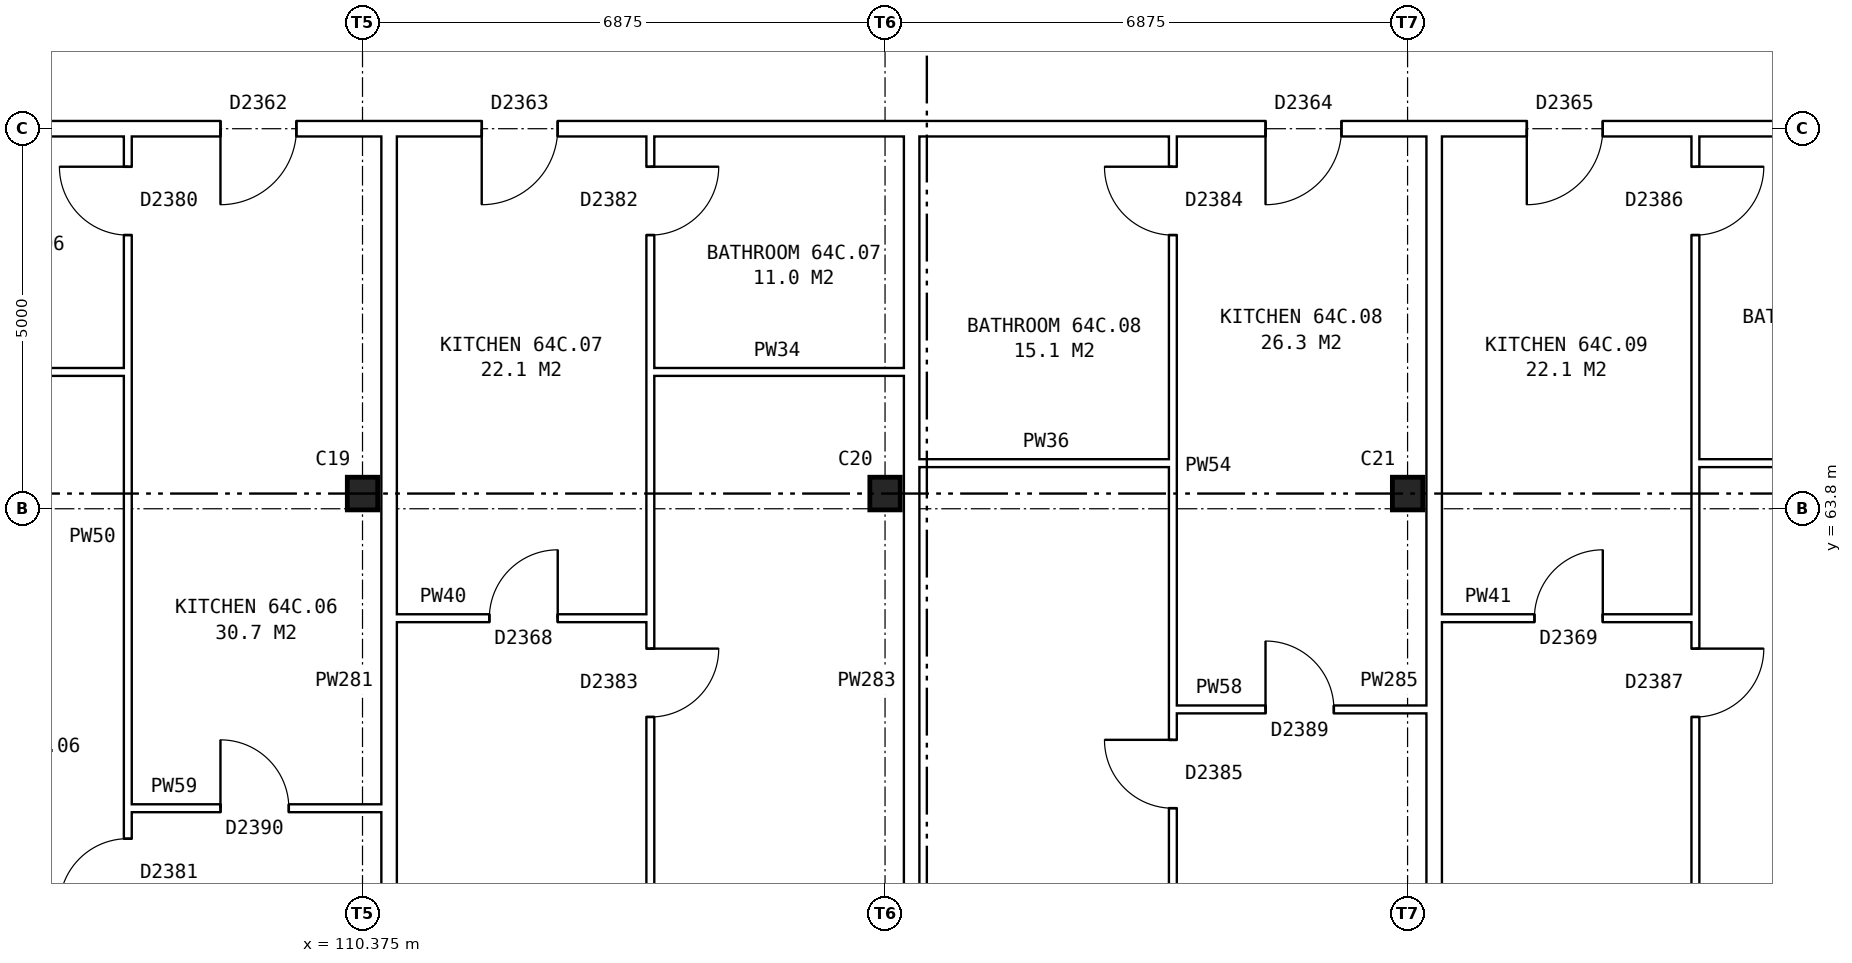
"""IFC4 building model, lengths in metres.
Left out: names, types, materials, properties, quantities, classifications, styles, units other than length and angle.
Written with IfcOpenShell. Run it as: python <this file> out.ifc"""

import sys

from ifc_helpers import new_model, si_unit, direction, frame, frame_2d, origin, origin_2d, place, context, subcontext, project, spatial, rectangle, i_section, extrude, element, fill, save


model = new_model("IFC4")
c1 = context("Model", 3, precision=1e-05, world=origin(), true_north=direction((0.0, 1.0)))
c2 = subcontext(c1, "Body", "Model", "MODEL_VIEW")
j1 = project(units=[si_unit("LENGTHUNIT", "METRE"), si_unit("PLANEANGLEUNIT", "RADIAN")], contexts=[c1])
p1 = place(None, origin())
s1 = spatial("IfcSite", under=j1, at=p1, CompositionType="ELEMENT")
p2 = place(p1, origin())
s2 = spatial("IfcBuilding", under=s1, at=p2, CompositionType="ELEMENT")
p3 = place(p2, frame((0.0, 0.0, 227.6)))
s3 = spatial("IfcBuildingStorey", under=s2, at=p3, CompositionType="ELEMENT", Elevation=227.6)
for number, where, z_axis, x_axis in (
    (1, (110.375, 64.0, 0.0), (0.0, 0.0, 1.0), (1.0, 0.0, 0.0)),
    (2, (117.25, 64.0, 0.0), (0.0, 0.0, 1.0), (1.0, 0.0, 0.0)),
    (3, (124.125, 64.0, 0.0), (0.0, 0.0, 1.0), (1.0, 0.0, 0.0)),
):
    element("IfcColumn", number, at=place(p3, frame(where, z_axis=z_axis, x_axis=x_axis)), inside=s3, PredefinedType="COLUMN", context=c2, shape_type="SweptSolid", body=[
        extrude(i_section(OverallWidth=0.4, OverallDepth=0.43, WebThickness=0.04, FlangeThickness=0.04, at=origin_2d()), origin(), (0.0, 0.0, 1.0), 2.85),
    ])
p4 = place(p3, frame((107.287, 59.86, 0.0), z_axis=(0.0, 0.0, 1.0), x_axis=(1.0, 0.0, 0.0)))
e4 = element("IfcWall", 4, at=p4, inside=s3, PredefinedType="PARTITIONING", context=c2, shape_type="SweptSolid", body=[
    extrude(rectangle(XDim=3.338, YDim=0.1, at=frame_2d((1.669, 0.0))), origin(), (0.0, 0.0, 1.0), 2.85),
])
p5 = place(p4, frame((1.219, 0.0, 0.0)))
e5 = element("IfcOpeningElement", 5, at=p5, cuts=e4, PredefinedType="OPENING", context=c2, shape_type="SweptSolid", body=[
    extrude(rectangle(XDim=0.9, YDim=2.1, at=frame_2d((0.45, 1.05))), frame((0.0, 0.06, 0.0), z_axis=(0.0, -1.0, 0.0), x_axis=(1.0, 0.0, 0.0)), (0.0, 0.0, 1.0), 0.12),
])
p6 = place(p3, frame((121.037, 61.16, 0.0), z_axis=(0.0, 0.0, 1.0), x_axis=(1.0, 0.0, 0.0)))
e6 = element("IfcWall", 6, at=p6, inside=s3, PredefinedType="PARTITIONING", context=c2, shape_type="SweptSolid", body=[
    extrude(rectangle(XDim=3.338, YDim=0.1, at=frame_2d((1.669, 0.0))), origin(), (0.0, 0.0, 1.0), 2.85),
])
p7 = place(p6, frame((1.219, 0.0, 0.0)))
e7 = element("IfcOpeningElement", 7, at=p7, cuts=e6, PredefinedType="OPENING", context=c2, shape_type="SweptSolid", body=[
    extrude(rectangle(XDim=0.9, YDim=2.1, at=frame_2d((0.45, 1.05))), frame((0.0, 0.06, 0.0), z_axis=(0.0, -1.0, 0.0), x_axis=(1.0, 0.0, 0.0)), (0.0, 0.0, 1.0), 0.12),
])
p8 = place(p3, frame((110.825, 62.36, 0.0), z_axis=(0.0, 0.0, 1.0), x_axis=(1.0, 0.0, 0.0)))
e8 = element("IfcWall", 8, at=p8, inside=s3, PredefinedType="PARTITIONING", context=c2, shape_type="SweptSolid", body=[
    extrude(rectangle(XDim=3.337, YDim=0.1, at=frame_2d((1.668, 0.0))), origin(), (0.0, 0.0, 1.0), 2.85),
])
p9 = place(p8, frame((1.219, 0.0, 0.0)))
e9 = element("IfcOpeningElement", 9, at=p9, cuts=e8, PredefinedType="OPENING", context=c2, shape_type="SweptSolid", body=[
    extrude(rectangle(XDim=0.9, YDim=2.1, at=frame_2d((0.45, 1.05))), frame((0.0, 0.06, 0.0), z_axis=(0.0, -1.0, 0.0), x_axis=(1.0, 0.0, 0.0)), (0.0, 0.0, 1.0), 0.12),
])
p10 = place(p3, frame((124.575, 62.36, 0.0), z_axis=(0.0, 0.0, 1.0), x_axis=(1.0, 0.0, 0.0)))
e10 = element("IfcWall", 10, at=p10, inside=s3, PredefinedType="PARTITIONING", context=c2, shape_type="SweptSolid", body=[
    extrude(rectangle(XDim=3.337, YDim=0.1, at=frame_2d((1.668, 0.0))), origin(), (0.0, 0.0, 1.0), 2.85),
])
p11 = place(p10, frame((1.219, 0.0, 0.0)))
e11 = element("IfcOpeningElement", 11, at=p11, cuts=e10, PredefinedType="OPENING", context=c2, shape_type="SweptSolid", body=[
    extrude(rectangle(XDim=0.9, YDim=2.1, at=frame_2d((0.45, 1.05))), frame((0.0, 0.06, 0.0), z_axis=(0.0, -1.0, 0.0), x_axis=(1.0, 0.0, 0.0)), (0.0, 0.0, 1.0), 0.12),
])
p12 = place(p3, frame((117.7, 64.4, 0.0), z_axis=(0.0, 0.0, 1.0), x_axis=(1.0, 0.0, 0.0)))
e12 = element("IfcWall", 12, at=p12, inside=s3, PredefinedType="PARTITIONING", context=c2, shape_type="SweptSolid", body=[
    extrude(rectangle(XDim=3.337, YDim=0.1, at=frame_2d((1.668, 0.0))), origin(), (0.0, 0.0, 1.0), 2.85),
])
p13 = place(p3, frame((127.912, 64.4, 0.0), z_axis=(0.0, 0.0, 1.0), x_axis=(1.0, 0.0, 0.0)))
e13 = element("IfcWall", 13, at=p13, inside=s3, PredefinedType="PARTITIONING", context=c2, shape_type="SweptSolid", body=[
    extrude(rectangle(XDim=3.448, YDim=0.1, at=frame_2d((1.724, 0.0))), origin(), (0.0, 0.0, 1.0), 2.85),
])
p14 = place(p3, frame((100.412, 65.6, 0.0), z_axis=(0.0, 0.0, 1.0), x_axis=(1.0, 0.0, 0.0)))
e14 = element("IfcWall", 14, at=p14, inside=s3, PredefinedType="PARTITIONING", context=c2, shape_type="SweptSolid", body=[
    extrude(rectangle(XDim=6.875, YDim=0.1, at=frame_2d((3.438, 0.0))), origin(), (0.0, 0.0, 1.0), 2.85),
])
p15 = place(p3, frame((114.162, 65.6, 0.0), z_axis=(0.0, 0.0, 1.0), x_axis=(1.0, 0.0, 0.0)))
e15 = element("IfcWall", 15, at=p15, inside=s3, PredefinedType="PARTITIONING", context=c2, shape_type="SweptSolid", body=[
    extrude(rectangle(XDim=3.338, YDim=0.1, at=frame_2d((1.669, 0.0))), origin(), (0.0, 0.0, 1.0), 2.85),
])
p16 = place(p3, frame((75.64, 68.8, 0.0), z_axis=(0.0, 0.0, 1.0), x_axis=(1.0, 0.0, 0.0)))
e16 = element("IfcWall", 16, at=p16, inside=s3, PredefinedType="PARTITIONING", context=c2, shape_type="SweptSolid", body=[
    extrude(rectangle(XDim=55.72, YDim=0.2, at=frame_2d((27.86, 0.0))), origin(), (0.0, 0.0, 1.0), 2.85),
])
p17 = place(p16, frame((1.399, 0.0, 0.0)))
e17 = element("IfcOpeningElement", 17, at=p17, cuts=e16, PredefinedType="OPENING", context=c2, shape_type="SweptSolid", body=[
    extrude(rectangle(XDim=1.0, YDim=2.1, at=frame_2d((0.5, 1.05))), frame((0.0, 0.11, 0.0), z_axis=(0.0, -1.0, 0.0), x_axis=(1.0, 0.0, 0.0)), (0.0, 0.0, 1.0), 0.22),
])
p18 = place(p16, frame((12.241, 0.0, 0.0)))
e18 = element("IfcOpeningElement", 18, at=p18, cuts=e16, PredefinedType="OPENING", context=c2, shape_type="SweptSolid", body=[
    extrude(rectangle(XDim=1.0, YDim=2.1, at=frame_2d((0.5, 1.05))), frame((0.0, 0.11, 0.0), z_axis=(0.0, -1.0, 0.0), x_axis=(1.0, 0.0, 0.0)), (0.0, 0.0, 1.0), 0.22),
])
p19 = place(p16, frame((22.553, 0.0, 0.0)))
e19 = element("IfcOpeningElement", 19, at=p19, cuts=e16, PredefinedType="OPENING", context=c2, shape_type="SweptSolid", body=[
    extrude(rectangle(XDim=1.0, YDim=2.1, at=frame_2d((0.5, 1.05))), frame((0.0, 0.11, 0.0), z_axis=(0.0, -1.0, 0.0), x_axis=(1.0, 0.0, 0.0)), (0.0, 0.0, 1.0), 0.22),
])
p20 = place(p16, frame((32.866, 0.0, 0.0)))
e20 = element("IfcOpeningElement", 20, at=p20, cuts=e16, PredefinedType="OPENING", context=c2, shape_type="SweptSolid", body=[
    extrude(rectangle(XDim=1.0, YDim=2.1, at=frame_2d((0.5, 1.05))), frame((0.0, 0.11, 0.0), z_axis=(0.0, -1.0, 0.0), x_axis=(1.0, 0.0, 0.0)), (0.0, 0.0, 1.0), 0.22),
])
p21 = place(p16, frame((36.303, 0.0, 0.0)))
e21 = element("IfcOpeningElement", 21, at=p21, cuts=e16, PredefinedType="OPENING", context=c2, shape_type="SweptSolid", body=[
    extrude(rectangle(XDim=1.0, YDim=2.1, at=frame_2d((0.5, 1.05))), frame((0.0, 0.11, 0.0), z_axis=(0.0, -1.0, 0.0), x_axis=(1.0, 0.0, 0.0)), (0.0, 0.0, 1.0), 0.22),
])
p22 = place(p16, frame((46.616, 0.0, 0.0)))
e22 = element("IfcOpeningElement", 22, at=p22, cuts=e16, PredefinedType="OPENING", context=c2, shape_type="SweptSolid", body=[
    extrude(rectangle(XDim=1.0, YDim=2.1, at=frame_2d((0.5, 1.05))), frame((0.0, 0.11, 0.0), z_axis=(0.0, -1.0, 0.0), x_axis=(1.0, 0.0, 0.0)), (0.0, 0.0, 1.0), 0.22),
])
p23 = place(p16, frame((50.053, 0.0, 0.0)))
e23 = element("IfcOpeningElement", 23, at=p23, cuts=e16, PredefinedType="OPENING", context=c2, shape_type="SweptSolid", body=[
    extrude(rectangle(XDim=1.0, YDim=2.1, at=frame_2d((0.5, 1.05))), frame((0.0, 0.11, 0.0), z_axis=(0.0, -1.0, 0.0), x_axis=(1.0, 0.0, 0.0)), (0.0, 0.0, 1.0), 0.22),
])
p24 = place(p3, frame((107.287, 54.36, 0.0), z_axis=(0.0, 0.0, 1.0), x_axis=(0.0, 1.0, 0.0)))
e24 = element("IfcWall", 24, at=p24, inside=s3, PredefinedType="PARTITIONING", context=c2, shape_type="SweptSolid", body=[
    extrude(rectangle(XDim=14.34, YDim=0.1, at=frame_2d((7.17, 0.0))), origin(), (0.0, 0.0, 1.0), 2.85),
])
p25 = place(p24, frame((4.2, 0.0, 0.0)))
e25 = element("IfcOpeningElement", 25, at=p25, cuts=e24, PredefinedType="OPENING", context=c2, shape_type="SweptSolid", body=[
    extrude(rectangle(XDim=0.9, YDim=2.1, at=frame_2d((0.45, 1.05))), frame((0.0, 0.06, 0.0), z_axis=(0.0, -1.0, 0.0), x_axis=(1.0, 0.0, 0.0)), (0.0, 0.0, 1.0), 0.12),
])
p26 = place(p24, frame((13.04, 0.0, 0.0)))
e26 = element("IfcOpeningElement", 26, at=p26, cuts=e24, PredefinedType="OPENING", context=c2, shape_type="SweptSolid", body=[
    extrude(rectangle(XDim=0.9, YDim=2.1, at=frame_2d((0.45, 1.05))), frame((0.0, 0.06, 0.0), z_axis=(0.0, -1.0, 0.0), x_axis=(1.0, 0.0, 0.0)), (0.0, 0.0, 1.0), 0.12),
])
p27 = place(p3, frame((110.725, 54.36, 0.0), z_axis=(0.0, 0.0, 1.0), x_axis=(0.0, 1.0, 0.0)))
e27 = element("IfcWall", 27, at=p27, inside=s3, PredefinedType="PARTITIONING", context=c2, shape_type="SweptSolid", body=[
    extrude(rectangle(XDim=14.34, YDim=0.2, at=frame_2d((7.17, 0.0))), origin(), (0.0, 0.0, 1.0), 2.85),
])
p28 = place(p3, frame((114.162, 54.36, 0.0), z_axis=(0.0, 0.0, 1.0), x_axis=(0.0, 1.0, 0.0)))
e28 = element("IfcWall", 28, at=p28, inside=s3, PredefinedType="PARTITIONING", context=c2, shape_type="SweptSolid", body=[
    extrude(rectangle(XDim=14.34, YDim=0.1, at=frame_2d((7.17, 0.0))), origin(), (0.0, 0.0, 1.0), 2.85),
])
p29 = place(p28, frame((6.7, 0.0, 0.0)))
e29 = element("IfcOpeningElement", 29, at=p29, cuts=e28, PredefinedType="OPENING", context=c2, shape_type="SweptSolid", body=[
    extrude(rectangle(XDim=0.9, YDim=2.1, at=frame_2d((0.45, 1.05))), frame((0.0, 0.06, 0.0), z_axis=(0.0, -1.0, 0.0), x_axis=(1.0, 0.0, 0.0)), (0.0, 0.0, 1.0), 0.12),
])
p30 = place(p28, frame((13.04, 0.0, 0.0)))
e30 = element("IfcOpeningElement", 30, at=p30, cuts=e28, PredefinedType="OPENING", context=c2, shape_type="SweptSolid", body=[
    extrude(rectangle(XDim=0.9, YDim=2.1, at=frame_2d((0.45, 1.05))), frame((0.0, 0.06, 0.0), z_axis=(0.0, -1.0, 0.0), x_axis=(1.0, 0.0, 0.0)), (0.0, 0.0, 1.0), 0.12),
])
p31 = place(p3, frame((117.6, 54.36, 0.0), z_axis=(0.0, 0.0, 1.0), x_axis=(0.0, 1.0, 0.0)))
e31 = element("IfcWall", 31, at=p31, inside=s3, PredefinedType="PARTITIONING", context=c2, shape_type="SweptSolid", body=[
    extrude(rectangle(XDim=14.34, YDim=0.2, at=frame_2d((7.17, 0.0))), origin(), (0.0, 0.0, 1.0), 2.85),
])
p32 = place(p3, frame((121.037, 54.36, 0.0), z_axis=(0.0, 0.0, 1.0), x_axis=(0.0, 1.0, 0.0)))
e32 = element("IfcWall", 32, at=p32, inside=s3, PredefinedType="PARTITIONING", context=c2, shape_type="SweptSolid", body=[
    extrude(rectangle(XDim=14.34, YDim=0.1, at=frame_2d((7.17, 0.0))), origin(), (0.0, 0.0, 1.0), 2.85),
])
p33 = place(p32, frame((5.5, 0.0, 0.0)))
e33 = element("IfcOpeningElement", 33, at=p33, cuts=e32, PredefinedType="OPENING", context=c2, shape_type="SweptSolid", body=[
    extrude(rectangle(XDim=0.9, YDim=2.1, at=frame_2d((0.45, 1.05))), frame((0.0, 0.06, 0.0), z_axis=(0.0, -1.0, 0.0), x_axis=(1.0, 0.0, 0.0)), (0.0, 0.0, 1.0), 0.12),
])
p34 = place(p32, frame((13.04, 0.0, 0.0)))
e34 = element("IfcOpeningElement", 34, at=p34, cuts=e32, PredefinedType="OPENING", context=c2, shape_type="SweptSolid", body=[
    extrude(rectangle(XDim=0.9, YDim=2.1, at=frame_2d((0.45, 1.05))), frame((0.0, 0.06, 0.0), z_axis=(0.0, -1.0, 0.0), x_axis=(1.0, 0.0, 0.0)), (0.0, 0.0, 1.0), 0.12),
])
p35 = place(p3, frame((124.475, 54.36, 0.0), z_axis=(0.0, 0.0, 1.0), x_axis=(0.0, 1.0, 0.0)))
e35 = element("IfcWall", 35, at=p35, inside=s3, PredefinedType="PARTITIONING", context=c2, shape_type="SweptSolid", body=[
    extrude(rectangle(XDim=14.34, YDim=0.2, at=frame_2d((7.17, 0.0))), origin(), (0.0, 0.0, 1.0), 2.85),
])
p36 = place(p3, frame((127.912, 54.36, 0.0), z_axis=(0.0, 0.0, 1.0), x_axis=(0.0, 1.0, 0.0)))
e36 = element("IfcWall", 36, at=p36, inside=s3, PredefinedType="PARTITIONING", context=c2, shape_type="SweptSolid", body=[
    extrude(rectangle(XDim=14.34, YDim=0.1, at=frame_2d((7.17, 0.0))), origin(), (0.0, 0.0, 1.0), 2.85),
])
p37 = place(p36, frame((6.7, 0.0, 0.0)))
e37 = element("IfcOpeningElement", 37, at=p37, cuts=e36, PredefinedType="OPENING", context=c2, shape_type="SweptSolid", body=[
    extrude(rectangle(XDim=0.9, YDim=2.1, at=frame_2d((0.45, 1.05))), frame((0.0, 0.06, 0.0), z_axis=(0.0, -1.0, 0.0), x_axis=(1.0, 0.0, 0.0)), (0.0, 0.0, 1.0), 0.12),
])
p38 = place(p36, frame((13.04, 0.0, 0.0)))
e38 = element("IfcOpeningElement", 38, at=p38, cuts=e36, PredefinedType="OPENING", context=c2, shape_type="SweptSolid", body=[
    extrude(rectangle(XDim=0.9, YDim=2.1, at=frame_2d((0.45, 1.05))), frame((0.0, 0.06, 0.0), z_axis=(0.0, -1.0, 0.0), x_axis=(1.0, 0.0, 0.0)), (0.0, 0.0, 1.0), 0.12),
])
p39 = place(p25, origin())
e39 = element("IfcDoor", 39, at=p39, inside=s3, OperationType="SINGLE_SWING_LEFT", PredefinedType="DOOR", context=c2, shape_type="SweptSolid", body=[
    extrude(rectangle(XDim=0.9, YDim=2.1, at=frame_2d((0.45, 1.05))), frame((0.0, 0.025, 0.0), z_axis=(0.0, -1.0, 0.0), x_axis=(1.0, 0.0, 0.0)), (0.0, 0.0, 1.0), 0.05),
])
fill(e25, e39)
p40 = place(p20, frame((1.0, 0.0, 0.0), z_axis=(0.0, 0.0, 1.0), x_axis=(-1.0, 0.0, 0.0)))
e40 = element("IfcDoor", 40, at=p40, inside=s3, OperationType="SINGLE_SWING_RIGHT", PredefinedType="DOOR", context=c2, shape_type="SweptSolid", body=[
    extrude(rectangle(XDim=1.0, YDim=2.1, at=frame_2d((0.5, 1.05))), frame((0.0, 0.025, 0.0), z_axis=(0.0, -1.0, 0.0), x_axis=(1.0, 0.0, 0.0)), (0.0, 0.0, 1.0), 0.05),
])
fill(e20, e40)
p41 = place(p5, origin())
e41 = element("IfcDoor", 41, at=p41, inside=s3, OperationType="SINGLE_SWING_LEFT", PredefinedType="DOOR", context=c2, shape_type="SweptSolid", body=[
    extrude(rectangle(XDim=0.9, YDim=2.1, at=frame_2d((0.45, 1.05))), frame((0.0, 0.025, 0.0), z_axis=(0.0, -1.0, 0.0), x_axis=(1.0, 0.0, 0.0)), (0.0, 0.0, 1.0), 0.05),
])
fill(e5, e41)
p42 = place(p26, origin())
e42 = element("IfcDoor", 42, at=p42, inside=s3, OperationType="SINGLE_SWING_RIGHT", PredefinedType="DOOR", context=c2, shape_type="SweptSolid", body=[
    extrude(rectangle(XDim=0.9, YDim=2.1, at=frame_2d((0.45, 1.05))), frame((0.0, 0.025, 0.0), z_axis=(0.0, -1.0, 0.0), x_axis=(1.0, 0.0, 0.0)), (0.0, 0.0, 1.0), 0.05),
])
fill(e26, e42)
p43 = place(p29, frame((0.9, 0.0, 0.0), z_axis=(0.0, 0.0, 1.0), x_axis=(-1.0, 0.0, 0.0)))
e43 = element("IfcDoor", 43, at=p43, inside=s3, OperationType="SINGLE_SWING_LEFT", PredefinedType="DOOR", context=c2, shape_type="SweptSolid", body=[
    extrude(rectangle(XDim=0.9, YDim=2.1, at=frame_2d((0.45, 1.05))), frame((0.0, 0.025, 0.0), z_axis=(0.0, -1.0, 0.0), x_axis=(1.0, 0.0, 0.0)), (0.0, 0.0, 1.0), 0.05),
])
fill(e29, e43)
p44 = place(p21, frame((1.0, 0.0, 0.0), z_axis=(0.0, 0.0, 1.0), x_axis=(-1.0, 0.0, 0.0)))
e44 = element("IfcDoor", 44, at=p44, inside=s3, OperationType="SINGLE_SWING_RIGHT", PredefinedType="DOOR", context=c2, shape_type="SweptSolid", body=[
    extrude(rectangle(XDim=1.0, YDim=2.1, at=frame_2d((0.5, 1.05))), frame((0.0, 0.025, 0.0), z_axis=(0.0, -1.0, 0.0), x_axis=(1.0, 0.0, 0.0)), (0.0, 0.0, 1.0), 0.05),
])
fill(e21, e44)
p45 = place(p9, origin())
e45 = element("IfcDoor", 45, at=p45, inside=s3, OperationType="SINGLE_SWING_RIGHT", PredefinedType="DOOR", context=c2, shape_type="SweptSolid", body=[
    extrude(rectangle(XDim=0.9, YDim=2.1, at=frame_2d((0.45, 1.05))), frame((0.0, 0.025, 0.0), z_axis=(0.0, -1.0, 0.0), x_axis=(1.0, 0.0, 0.0)), (0.0, 0.0, 1.0), 0.05),
])
fill(e9, e45)
p46 = place(p30, frame((0.9, 0.0, 0.0), z_axis=(0.0, 0.0, 1.0), x_axis=(-1.0, 0.0, 0.0)))
e46 = element("IfcDoor", 46, at=p46, inside=s3, OperationType="SINGLE_SWING_LEFT", PredefinedType="DOOR", context=c2, shape_type="SweptSolid", body=[
    extrude(rectangle(XDim=0.9, YDim=2.1, at=frame_2d((0.45, 1.05))), frame((0.0, 0.025, 0.0), z_axis=(0.0, -1.0, 0.0), x_axis=(1.0, 0.0, 0.0)), (0.0, 0.0, 1.0), 0.05),
])
fill(e30, e46)
p47 = place(p33, origin())
e47 = element("IfcDoor", 47, at=p47, inside=s3, OperationType="SINGLE_SWING_RIGHT", PredefinedType="DOOR", context=c2, shape_type="SweptSolid", body=[
    extrude(rectangle(XDim=0.9, YDim=2.1, at=frame_2d((0.45, 1.05))), frame((0.0, 0.025, 0.0), z_axis=(0.0, -1.0, 0.0), x_axis=(1.0, 0.0, 0.0)), (0.0, 0.0, 1.0), 0.05),
])
fill(e33, e47)
p48 = place(p22, frame((1.0, 0.0, 0.0), z_axis=(0.0, 0.0, 1.0), x_axis=(-1.0, 0.0, 0.0)))
e48 = element("IfcDoor", 48, at=p48, inside=s3, OperationType="SINGLE_SWING_RIGHT", PredefinedType="DOOR", context=c2, shape_type="SweptSolid", body=[
    extrude(rectangle(XDim=1.0, YDim=2.1, at=frame_2d((0.5, 1.05))), frame((0.0, 0.025, 0.0), z_axis=(0.0, -1.0, 0.0), x_axis=(1.0, 0.0, 0.0)), (0.0, 0.0, 1.0), 0.05),
])
fill(e22, e48)
p49 = place(p7, origin())
e49 = element("IfcDoor", 49, at=p49, inside=s3, OperationType="SINGLE_SWING_LEFT", PredefinedType="DOOR", context=c2, shape_type="SweptSolid", body=[
    extrude(rectangle(XDim=0.9, YDim=2.1, at=frame_2d((0.45, 1.05))), frame((0.0, 0.025, 0.0), z_axis=(0.0, -1.0, 0.0), x_axis=(1.0, 0.0, 0.0)), (0.0, 0.0, 1.0), 0.05),
])
fill(e7, e49)
p50 = place(p34, origin())
e50 = element("IfcDoor", 50, at=p50, inside=s3, OperationType="SINGLE_SWING_RIGHT", PredefinedType="DOOR", context=c2, shape_type="SweptSolid", body=[
    extrude(rectangle(XDim=0.9, YDim=2.1, at=frame_2d((0.45, 1.05))), frame((0.0, 0.025, 0.0), z_axis=(0.0, -1.0, 0.0), x_axis=(1.0, 0.0, 0.0)), (0.0, 0.0, 1.0), 0.05),
])
fill(e34, e50)
p51 = place(p37, frame((0.9, 0.0, 0.0), z_axis=(0.0, 0.0, 1.0), x_axis=(-1.0, 0.0, 0.0)))
e51 = element("IfcDoor", 51, at=p51, inside=s3, OperationType="SINGLE_SWING_LEFT", PredefinedType="DOOR", context=c2, shape_type="SweptSolid", body=[
    extrude(rectangle(XDim=0.9, YDim=2.1, at=frame_2d((0.45, 1.05))), frame((0.0, 0.025, 0.0), z_axis=(0.0, -1.0, 0.0), x_axis=(1.0, 0.0, 0.0)), (0.0, 0.0, 1.0), 0.05),
])
fill(e37, e51)
p52 = place(p23, frame((1.0, 0.0, 0.0), z_axis=(0.0, 0.0, 1.0), x_axis=(-1.0, 0.0, 0.0)))
e52 = element("IfcDoor", 52, at=p52, inside=s3, OperationType="SINGLE_SWING_RIGHT", PredefinedType="DOOR", context=c2, shape_type="SweptSolid", body=[
    extrude(rectangle(XDim=1.0, YDim=2.1, at=frame_2d((0.5, 1.05))), frame((0.0, 0.025, 0.0), z_axis=(0.0, -1.0, 0.0), x_axis=(1.0, 0.0, 0.0)), (0.0, 0.0, 1.0), 0.05),
])
fill(e23, e52)
p53 = place(p11, origin())
e53 = element("IfcDoor", 53, at=p53, inside=s3, OperationType="SINGLE_SWING_RIGHT", PredefinedType="DOOR", context=c2, shape_type="SweptSolid", body=[
    extrude(rectangle(XDim=0.9, YDim=2.1, at=frame_2d((0.45, 1.05))), frame((0.0, 0.025, 0.0), z_axis=(0.0, -1.0, 0.0), x_axis=(1.0, 0.0, 0.0)), (0.0, 0.0, 1.0), 0.05),
])
fill(e11, e53)
p54 = place(p38, frame((0.9, 0.0, 0.0), z_axis=(0.0, 0.0, 1.0), x_axis=(-1.0, 0.0, 0.0)))
e54 = element("IfcDoor", 54, at=p54, inside=s3, OperationType="SINGLE_SWING_LEFT", PredefinedType="DOOR", context=c2, shape_type="SweptSolid", body=[
    extrude(rectangle(XDim=0.9, YDim=2.1, at=frame_2d((0.45, 1.05))), frame((0.0, 0.025, 0.0), z_axis=(0.0, -1.0, 0.0), x_axis=(1.0, 0.0, 0.0)), (0.0, 0.0, 1.0), 0.05),
])
fill(e38, e54)
save(model, sys.argv[1])
